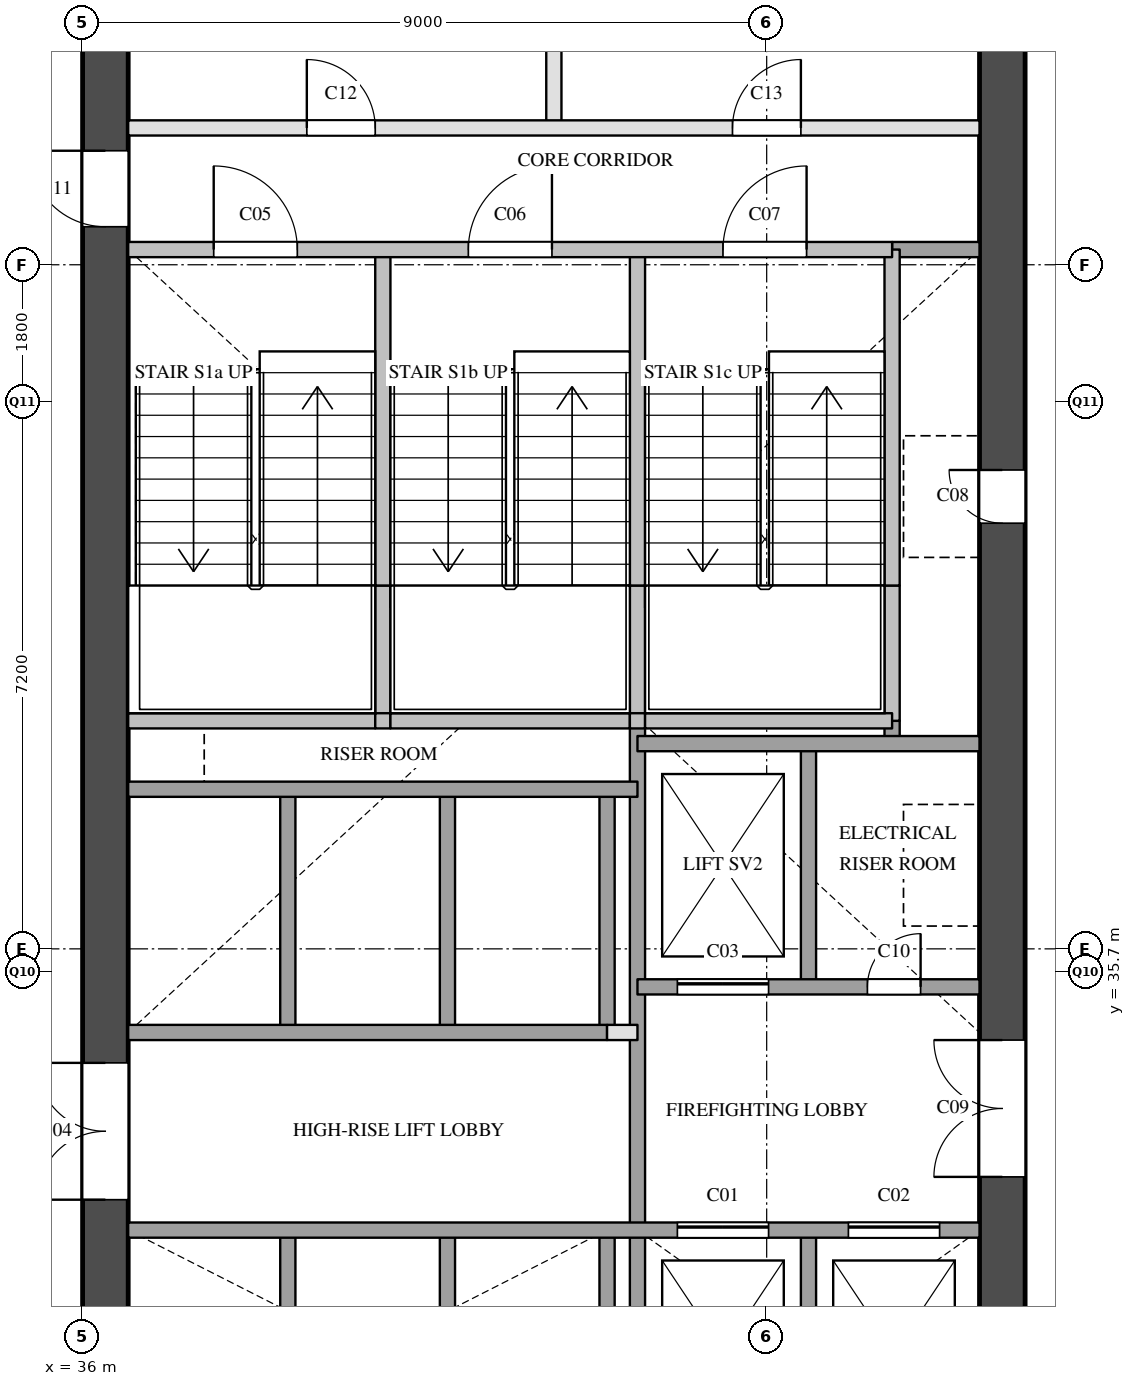
"""IFC4 building model, lengths in metres.
Left out: names, types, materials, properties, quantities, classifications, styles, units other than length and angle.
Written with IfcOpenShell. Run it as: python <this file> out.ifc"""

import sys

from ifc_helpers import new_model, si_unit, direction, frame, frame_2d, origin, place, context, subcontext, project, spatial, rectangle, extrude, element, fill, save


model = new_model("IFC4")
c1 = context("Model", 3, precision=1e-05, world=origin(), true_north=direction((0.0, 1.0)))
c2 = subcontext(c1, "Body", "Model", "MODEL_VIEW")
j1 = project(units=[si_unit("LENGTHUNIT", "METRE"), si_unit("PLANEANGLEUNIT", "RADIAN")], contexts=[c1])
p1 = place(None, origin())
s1 = spatial("IfcSite", under=j1, at=p1, CompositionType="ELEMENT")
p2 = place(p1, origin())
s2 = spatial("IfcBuilding", under=s1, at=p2, CompositionType="ELEMENT")
p3 = place(p2, frame((0.0, 0.0, 119.6)))
s3 = spatial("IfcBuildingStorey", under=s2, at=p3, CompositionType="ELEMENT", Elevation=119.6)
p4 = place(p3, frame((36.3, 29.1, 0.0), z_axis=(0.0, 0.0, 1.0), x_axis=(0.0, 1.0, 0.0)))
e1 = element("IfcWall", 1, at=p4, inside=s3, PredefinedType="SHEAR", context=c2, shape_type="SweptSolid", body=[
    extrude(rectangle(XDim=20.3, YDim=0.6, at=frame_2d((10.15, 0.0))), origin(), (0.0, 0.0, 1.0), 3.3),
])
p5 = place(p4, frame((3.6, 0.0, 0.0)))
e2 = element("IfcOpeningElement", 2, at=p5, cuts=e1, PredefinedType="OPENING", context=c2, shape_type="SweptSolid", body=[
    extrude(rectangle(XDim=1.8, YDim=2.1, at=frame_2d((0.9, 1.05))), frame((0.0, 0.31, 0.0), z_axis=(0.0, -1.0, 0.0), x_axis=(1.0, 0.0, 0.0)), (0.0, 0.0, 1.0), 0.62),
])
p6 = place(p4, frame((16.4, 0.0, 0.0)))
e3 = element("IfcOpeningElement", 3, at=p6, cuts=e1, PredefinedType="OPENING", context=c2, shape_type="SweptSolid", body=[
    extrude(rectangle(XDim=1.0, YDim=2.1, at=frame_2d((0.5, 1.05))), frame((0.0, 0.31, 0.0), z_axis=(0.0, -1.0, 0.0), x_axis=(1.0, 0.0, 0.0)), (0.0, 0.0, 1.0), 0.62),
])
p7 = place(p3, frame((48.1, 29.1, 0.0), z_axis=(0.0, 0.0, 1.0), x_axis=(0.0, 1.0, 0.0)))
e4 = element("IfcWall", 4, at=p7, inside=s3, PredefinedType="SHEAR", context=c2, shape_type="SweptSolid", body=[
    extrude(rectangle(XDim=20.3, YDim=0.6, at=frame_2d((10.15, 0.0))), origin(), (0.0, 0.0, 1.0), 3.3),
])
p8 = place(p7, frame((12.5, 0.0, 0.0)))
e5 = element("IfcOpeningElement", 5, at=p8, cuts=e4, PredefinedType="OPENING", context=c2, shape_type="SweptSolid", body=[
    extrude(rectangle(XDim=0.7, YDim=2.1, at=frame_2d((0.35, 1.05))), frame((0.0, 0.31, 0.0), z_axis=(0.0, -1.0, 0.0), x_axis=(1.0, 0.0, 0.0)), (0.0, 0.0, 1.0), 0.62),
])
p9 = place(p7, frame((3.9, 0.0, 0.0)))
e6 = element("IfcOpeningElement", 6, at=p9, cuts=e4, PredefinedType="OPENING", context=c2, shape_type="SweptSolid", body=[
    extrude(rectangle(XDim=1.8, YDim=2.1, at=frame_2d((0.9, 1.05))), frame((0.0, 0.31, 0.0), z_axis=(0.0, -1.0, 0.0), x_axis=(1.0, 0.0, 0.0)), (0.0, 0.0, 1.0), 0.62),
])
p10 = place(p3, frame((38.7, 29.1, 0.0), z_axis=(0.0, 0.0, 1.0), x_axis=(0.0, 1.0, 0.0)))
e7 = element("IfcWall", 7, at=p10, inside=s3, PredefinedType="SOLIDWALL", context=c2, shape_type="SweptSolid", body=[
    extrude(rectangle(XDim=3.2, YDim=0.2, at=frame_2d((1.6, 0.0))), origin(), (0.0, 0.0, 1.0), 3.3),
])
p11 = place(p3, frame((38.7, 34.9, 0.0), z_axis=(0.0, 0.0, 1.0), x_axis=(0.0, 1.0, 0.0)))
e8 = element("IfcWall", 8, at=p11, inside=s3, PredefinedType="SOLIDWALL", context=c2, shape_type="SweptSolid", body=[
    extrude(rectangle(XDim=3.2, YDim=0.2, at=frame_2d((1.6, 0.0))), origin(), (0.0, 0.0, 1.0), 3.3),
])
p12 = place(p3, frame((39.95, 39.0, 0.0), z_axis=(0.0, 0.0, 1.0), x_axis=(0.0, 1.0, 0.0)))
e9 = element("IfcWall", 9, at=p12, inside=s3, PredefinedType="SOLIDWALL", context=c2, shape_type="SweptSolid", body=[
    extrude(rectangle(XDim=1.78, YDim=0.2, at=frame_2d((0.89, 0.0))), origin(), (0.0, 0.0, 1.0), 3.3),
])
p13 = place(p3, frame((39.95, 40.78, 0.0), z_axis=(0.0, 0.0, 1.0), x_axis=(0.0, 1.0, 0.0)))
e10 = element("IfcWall", 10, at=p13, inside=s3, PredefinedType="SOLIDWALL", context=c2, shape_type="SweptSolid", body=[
    extrude(rectangle(XDim=4.42, YDim=0.2, at=frame_2d((2.21, 0.0))), origin(), (0.0, 0.0, 1.0), 3.3),
])
p14 = place(p3, frame((40.8, 29.1, 0.0), z_axis=(0.0, 0.0, 1.0), x_axis=(0.0, 1.0, 0.0)))
e11 = element("IfcWall", 11, at=p14, inside=s3, PredefinedType="SOLIDWALL", context=c2, shape_type="SweptSolid", body=[
    extrude(rectangle(XDim=3.2, YDim=0.2, at=frame_2d((1.6, 0.0))), origin(), (0.0, 0.0, 1.0), 3.3),
])
p15 = place(p3, frame((40.8, 34.9, 0.0), z_axis=(0.0, 0.0, 1.0), x_axis=(0.0, 1.0, 0.0)))
e12 = element("IfcWall", 12, at=p15, inside=s3, PredefinedType="SOLIDWALL", context=c2, shape_type="SweptSolid", body=[
    extrude(rectangle(XDim=3.2, YDim=0.2, at=frame_2d((1.6, 0.0))), origin(), (0.0, 0.0, 1.0), 3.3),
])
p16 = place(p3, frame((42.2, 46.8, 0.0), z_axis=(0.0, 0.0, 1.0), x_axis=(0.0, 1.0, 0.0)))
e13 = element("IfcWall", 13, at=p16, inside=s3, PredefinedType="PARTITIONING", context=c2, shape_type="SweptSolid", body=[
    extrude(rectangle(XDim=2.2, YDim=0.2, at=frame_2d((1.1, 0.0))), origin(), (0.0, 0.0, 1.0), 3.3),
])
p17 = place(p3, frame((42.9, 29.1, 0.0), z_axis=(0.0, 0.0, 1.0), x_axis=(0.0, 1.0, 0.0)))
e14 = element("IfcWall", 14, at=p17, inside=s3, PredefinedType="SOLIDWALL", context=c2, shape_type="SweptSolid", body=[
    extrude(rectangle(XDim=3.2, YDim=0.2, at=frame_2d((1.6, 0.0))), origin(), (0.0, 0.0, 1.0), 3.3),
])
p18 = place(p3, frame((42.9, 34.9, 0.0), z_axis=(0.0, 0.0, 1.0), x_axis=(0.0, 1.0, 0.0)))
e15 = element("IfcWall", 15, at=p18, inside=s3, PredefinedType="SOLIDWALL", context=c2, shape_type="SweptSolid", body=[
    extrude(rectangle(XDim=3.2, YDim=0.2, at=frame_2d((1.6, 0.0))), origin(), (0.0, 0.0, 1.0), 3.3),
])
p19 = place(p3, frame((43.3, 29.1, 0.0), z_axis=(0.0, 0.0, 1.0), x_axis=(0.0, 1.0, 0.0)))
e16 = element("IfcWall", 16, at=p19, inside=s3, PredefinedType="SOLIDWALL", context=c2, shape_type="SweptSolid", body=[
    extrude(rectangle(XDim=9.9, YDim=0.2, at=frame_2d((4.95, 0.0))), origin(), (0.0, 0.0, 1.0), 3.3),
])
p20 = place(p3, frame((43.3, 39.0, 0.0), z_axis=(0.0, 0.0, 1.0), x_axis=(0.0, 1.0, 0.0)))
e17 = element("IfcWall", 17, at=p20, inside=s3, PredefinedType="SOLIDWALL", context=c2, shape_type="SweptSolid", body=[
    extrude(rectangle(XDim=1.78, YDim=0.2, at=frame_2d((0.89, 0.0))), origin(), (0.0, 0.0, 1.0), 3.3),
])
p21 = place(p3, frame((43.3, 40.78, 0.0), z_axis=(0.0, 0.0, 1.0), x_axis=(0.0, 1.0, 0.0)))
e18 = element("IfcWall", 18, at=p21, inside=s3, PredefinedType="SOLIDWALL", context=c2, shape_type="SweptSolid", body=[
    extrude(rectangle(XDim=4.42, YDim=0.2, at=frame_2d((2.21, 0.0))), origin(), (0.0, 0.0, 1.0), 3.3),
])
for number, where, z_axis, x_axis in (
    (19, (45.55, 29.1, 0.0), (0.0, 0.0, 1.0), (0.0, 1.0, 0.0)),
    (20, (45.55, 35.5, 0.0), (0.0, 0.0, 1.0), (0.0, 1.0, 0.0)),
):
    element("IfcWall", number, at=place(p3, frame(where, z_axis=z_axis, x_axis=x_axis)), inside=s3, PredefinedType="SOLIDWALL", context=c2, shape_type="SweptSolid", body=[
        extrude(rectangle(XDim=3.2, YDim=0.2, at=frame_2d((1.6, 0.0))), origin(), (0.0, 0.0, 1.0), 3.3),
    ])
p22 = place(p3, frame((46.65, 38.7, 0.0), z_axis=(0.0, 0.0, 1.0), x_axis=(0.0, 1.0, 0.0)))
e21 = element("IfcWall", 21, at=p22, inside=s3, PredefinedType="SOLIDWALL", context=c2, shape_type="SweptSolid", body=[
    extrude(rectangle(XDim=0.3, YDim=0.2, at=frame_2d((0.15, 0.0))), origin(), (0.0, 0.0, 1.0), 3.3),
])
p23 = place(p3, frame((46.65, 39.0, 0.0), z_axis=(0.0, 0.0, 1.0), x_axis=(0.0, 1.0, 0.0)))
e22 = element("IfcWall", 22, at=p23, inside=s3, PredefinedType="SOLIDWALL", context=c2, shape_type="SweptSolid", body=[
    extrude(rectangle(XDim=1.78, YDim=0.2, at=frame_2d((0.89, 0.0))), origin(), (0.0, 0.0, 1.0), 3.3),
])
p24 = place(p3, frame((46.65, 40.78, 0.0), z_axis=(0.0, 0.0, 1.0), x_axis=(0.0, 1.0, 0.0)))
e23 = element("IfcWall", 23, at=p24, inside=s3, PredefinedType="SOLIDWALL", context=c2, shape_type="SweptSolid", body=[
    extrude(rectangle(XDim=4.42, YDim=0.2, at=frame_2d((2.21, 0.0))), origin(), (0.0, 0.0, 1.0), 3.3),
])
p25 = place(p3, frame((36.6, 32.3, 0.0), z_axis=(0.0, 0.0, 1.0), x_axis=(1.0, 0.0, 0.0)))
e24 = element("IfcWall", 24, at=p25, inside=s3, PredefinedType="SOLIDWALL", context=c2, shape_type="SweptSolid", body=[
    extrude(rectangle(XDim=11.2, YDim=0.2, at=frame_2d((5.6, 0.0))), origin(), (0.0, 0.0, 1.0), 3.3),
])
p26 = place(p25, frame((7.225, 0.0, 0.0)))
e25 = element("IfcOpeningElement", 25, at=p26, cuts=e24, PredefinedType="OPENING", context=c2, shape_type="SweptSolid", body=[
    extrude(rectangle(XDim=1.2, YDim=2.1, at=frame_2d((0.6, 1.05))), frame((0.0, 0.11, 0.0), z_axis=(0.0, -1.0, 0.0), x_axis=(1.0, 0.0, 0.0)), (0.0, 0.0, 1.0), 0.22),
])
p27 = place(p25, frame((9.475, 0.0, 0.0)))
e26 = element("IfcOpeningElement", 26, at=p27, cuts=e24, PredefinedType="OPENING", context=c2, shape_type="SweptSolid", body=[
    extrude(rectangle(XDim=1.2, YDim=2.1, at=frame_2d((0.6, 1.05))), frame((0.0, 0.11, 0.0), z_axis=(0.0, -1.0, 0.0), x_axis=(1.0, 0.0, 0.0)), (0.0, 0.0, 1.0), 0.22),
])
p28 = place(p3, frame((42.9, 34.9, 0.0), z_axis=(0.0, 0.0, 1.0), x_axis=(1.0, 0.0, 0.0)))
e27 = element("IfcWall", 27, at=p28, inside=s3, PredefinedType="PARTITIONING", context=c2, shape_type="SweptSolid", body=[
    extrude(rectangle(XDim=0.4, YDim=0.2, at=frame_2d((0.2, 0.0))), origin(), (0.0, 0.0, 1.0), 3.3),
])
p29 = place(p3, frame((36.6, 34.9, 0.0), z_axis=(0.0, 0.0, 1.0), x_axis=(1.0, 0.0, 0.0)))
e28 = element("IfcWall", 28, at=p29, inside=s3, PredefinedType="SOLIDWALL", context=c2, shape_type="SweptSolid", body=[
    extrude(rectangle(XDim=6.3, YDim=0.2, at=frame_2d((3.15, 0.0))), origin(), (0.0, 0.0, 1.0), 3.3),
])
p30 = place(p3, frame((43.3, 35.5, 0.0), z_axis=(0.0, 0.0, 1.0), x_axis=(1.0, 0.0, 0.0)))
e29 = element("IfcWall", 29, at=p30, inside=s3, PredefinedType="SOLIDWALL", context=c2, shape_type="SweptSolid", body=[
    extrude(rectangle(XDim=4.5, YDim=0.2, at=frame_2d((2.25, 0.0))), origin(), (0.0, 0.0, 1.0), 3.3),
])
p31 = place(p30, frame((0.525, 0.0, 0.0)))
e30 = element("IfcOpeningElement", 30, at=p31, cuts=e29, PredefinedType="OPENING", context=c2, shape_type="SweptSolid", body=[
    extrude(rectangle(XDim=1.2, YDim=2.1, at=frame_2d((0.6, 1.05))), frame((0.0, 0.11, 0.0), z_axis=(0.0, -1.0, 0.0), x_axis=(1.0, 0.0, 0.0)), (0.0, 0.0, 1.0), 0.22),
])
p32 = place(p30, frame((3.025, 0.0, 0.0)))
e31 = element("IfcOpeningElement", 31, at=p32, cuts=e29, PredefinedType="OPENING", context=c2, shape_type="SweptSolid", body=[
    extrude(rectangle(XDim=0.7, YDim=2.1, at=frame_2d((0.35, 1.05))), frame((0.0, 0.11, 0.0), z_axis=(0.0, -1.0, 0.0), x_axis=(1.0, 0.0, 0.0)), (0.0, 0.0, 1.0), 0.22),
])
p33 = place(p3, frame((36.6, 38.1, 0.0), z_axis=(0.0, 0.0, 1.0), x_axis=(1.0, 0.0, 0.0)))
e32 = element("IfcWall", 32, at=p33, inside=s3, PredefinedType="SOLIDWALL", context=c2, shape_type="SweptSolid", body=[
    extrude(rectangle(XDim=6.7, YDim=0.2, at=frame_2d((3.35, 0.0))), origin(), (0.0, 0.0, 1.0), 3.3),
])
p34 = place(p3, frame((43.3, 38.7, 0.0), z_axis=(0.0, 0.0, 1.0), x_axis=(1.0, 0.0, 0.0)))
e33 = element("IfcWall", 33, at=p34, inside=s3, PredefinedType="SOLIDWALL", context=c2, shape_type="SweptSolid", body=[
    extrude(rectangle(XDim=4.5, YDim=0.2, at=frame_2d((2.25, 0.0))), origin(), (0.0, 0.0, 1.0), 3.3),
])
p35 = place(p3, frame((36.6, 39.0, 0.0), z_axis=(0.0, 0.0, 1.0), x_axis=(1.0, 0.0, 0.0)))
e34 = element("IfcWall", 34, at=p35, inside=s3, PredefinedType="SOLIDWALL", context=c2, shape_type="SweptSolid", body=[
    extrude(rectangle(XDim=3.25, YDim=0.2, at=frame_2d((1.625, 0.0))), origin(), (0.0, 0.0, 1.0), 3.3),
])
p36 = place(p3, frame((39.85, 39.0, 0.0), z_axis=(0.0, 0.0, 1.0), x_axis=(1.0, 0.0, 0.0)))
e35 = element("IfcWall", 35, at=p36, inside=s3, PredefinedType="SOLIDWALL", context=c2, shape_type="SweptSolid", body=[
    extrude(rectangle(XDim=0.2, YDim=0.2, at=frame_2d((0.1, 0.0))), origin(), (0.0, 0.0, 1.0), 3.3),
])
p37 = place(p3, frame((40.05, 39.0, 0.0), z_axis=(0.0, 0.0, 1.0), x_axis=(1.0, 0.0, 0.0)))
e36 = element("IfcWall", 36, at=p37, inside=s3, PredefinedType="SOLIDWALL", context=c2, shape_type="SweptSolid", body=[
    extrude(rectangle(XDim=3.15, YDim=0.2, at=frame_2d((1.575, 0.0))), origin(), (0.0, 0.0, 1.0), 3.3),
])
p38 = place(p3, frame((43.2, 39.0, 0.0), z_axis=(0.0, 0.0, 1.0), x_axis=(1.0, 0.0, 0.0)))
e37 = element("IfcWall", 37, at=p38, inside=s3, PredefinedType="SOLIDWALL", context=c2, shape_type="SweptSolid", body=[
    extrude(rectangle(XDim=0.2, YDim=0.2, at=frame_2d((0.1, 0.0))), origin(), (0.0, 0.0, 1.0), 3.3),
])
p39 = place(p3, frame((43.4, 39.0, 0.0), z_axis=(0.0, 0.0, 1.0), x_axis=(1.0, 0.0, 0.0)))
e38 = element("IfcWall", 38, at=p39, inside=s3, PredefinedType="SOLIDWALL", context=c2, shape_type="SweptSolid", body=[
    extrude(rectangle(XDim=3.25, YDim=0.2, at=frame_2d((1.625, 0.0))), origin(), (0.0, 0.0, 1.0), 3.3),
])
p40 = place(p3, frame((46.65, 45.2, 0.0), z_axis=(0.0, 0.0, 1.0), x_axis=(1.0, 0.0, 0.0)))
e39 = element("IfcWall", 39, at=p40, inside=s3, PredefinedType="SOLIDWALL", context=c2, shape_type="SweptSolid", body=[
    extrude(rectangle(XDim=1.15, YDim=0.2, at=frame_2d((0.575, 0.0))), origin(), (0.0, 0.0, 1.0), 3.3),
])
p41 = place(p3, frame((36.6, 45.2, 0.0), z_axis=(0.0, 0.0, 1.0), x_axis=(1.0, 0.0, 0.0)))
e40 = element("IfcWall", 40, at=p41, inside=s3, PredefinedType="SOLIDWALL", context=c2, shape_type="SweptSolid", body=[
    extrude(rectangle(XDim=10.05, YDim=0.2, at=frame_2d((5.025, 0.0))), origin(), (0.0, 0.0, 1.0), 3.3),
])
p42 = place(p41, frame((1.125, 0.0, 0.0)))
e41 = element("IfcOpeningElement", 41, at=p42, cuts=e40, PredefinedType="OPENING", context=c2, shape_type="SweptSolid", body=[
    extrude(rectangle(XDim=1.1, YDim=2.1, at=frame_2d((0.55, 1.05))), frame((0.0, 0.11, 0.0), z_axis=(0.0, -1.0, 0.0), x_axis=(1.0, 0.0, 0.0)), (0.0, 0.0, 1.0), 0.22),
])
p43 = place(p41, frame((4.475, 0.0, 0.0)))
e42 = element("IfcOpeningElement", 42, at=p43, cuts=e40, PredefinedType="OPENING", context=c2, shape_type="SweptSolid", body=[
    extrude(rectangle(XDim=1.1, YDim=2.1, at=frame_2d((0.55, 1.05))), frame((0.0, 0.11, 0.0), z_axis=(0.0, -1.0, 0.0), x_axis=(1.0, 0.0, 0.0)), (0.0, 0.0, 1.0), 0.22),
])
p44 = place(p41, frame((7.825, 0.0, 0.0)))
e43 = element("IfcOpeningElement", 43, at=p44, cuts=e40, PredefinedType="OPENING", context=c2, shape_type="SweptSolid", body=[
    extrude(rectangle(XDim=1.1, YDim=2.1, at=frame_2d((0.55, 1.05))), frame((0.0, 0.11, 0.0), z_axis=(0.0, -1.0, 0.0), x_axis=(1.0, 0.0, 0.0)), (0.0, 0.0, 1.0), 0.22),
])
p45 = place(p3, frame((36.6, 46.8, 0.0), z_axis=(0.0, 0.0, 1.0), x_axis=(1.0, 0.0, 0.0)))
e44 = element("IfcWall", 44, at=p45, inside=s3, PredefinedType="PARTITIONING", context=c2, shape_type="SweptSolid", body=[
    extrude(rectangle(XDim=11.2, YDim=0.2, at=frame_2d((5.6, 0.0))), origin(), (0.0, 0.0, 1.0), 3.3),
])
p46 = place(p45, frame((2.35, 0.0, 0.0)))
e45 = element("IfcOpeningElement", 45, at=p46, cuts=e44, PredefinedType="OPENING", context=c2, shape_type="SweptSolid", body=[
    extrude(rectangle(XDim=0.9, YDim=2.1, at=frame_2d((0.45, 1.05))), frame((0.0, 0.11, 0.0), z_axis=(0.0, -1.0, 0.0), x_axis=(1.0, 0.0, 0.0)), (0.0, 0.0, 1.0), 0.22),
])
p47 = place(p45, frame((7.95, 0.0, 0.0)))
e46 = element("IfcOpeningElement", 46, at=p47, cuts=e44, PredefinedType="OPENING", context=c2, shape_type="SweptSolid", body=[
    extrude(rectangle(XDim=0.9, YDim=2.1, at=frame_2d((0.45, 1.05))), frame((0.0, 0.11, 0.0), z_axis=(0.0, -1.0, 0.0), x_axis=(1.0, 0.0, 0.0)), (0.0, 0.0, 1.0), 0.22),
])
p48 = place(p26, origin())
e47 = element("IfcDoor", 47, at=p48, inside=s3, OperationType="SLIDING_TO_LEFT", PredefinedType="DOOR", context=c2, shape_type="SweptSolid", body=[
    extrude(rectangle(XDim=1.2, YDim=2.1, at=frame_2d((0.6, 1.05))), frame((0.0, 0.025, 0.0), z_axis=(0.0, -1.0, 0.0), x_axis=(1.0, 0.0, 0.0)), (0.0, 0.0, 1.0), 0.05),
])
fill(e25, e47)
p49 = place(p27, origin())
e48 = element("IfcDoor", 48, at=p49, inside=s3, OperationType="SLIDING_TO_LEFT", PredefinedType="DOOR", context=c2, shape_type="SweptSolid", body=[
    extrude(rectangle(XDim=1.2, YDim=2.1, at=frame_2d((0.6, 1.05))), frame((0.0, 0.025, 0.0), z_axis=(0.0, -1.0, 0.0), x_axis=(1.0, 0.0, 0.0)), (0.0, 0.0, 1.0), 0.05),
])
fill(e26, e48)
p50 = place(p31, origin())
e49 = element("IfcDoor", 49, at=p50, inside=s3, OperationType="SLIDING_TO_LEFT", PredefinedType="DOOR", context=c2, shape_type="SweptSolid", body=[
    extrude(rectangle(XDim=1.2, YDim=2.1, at=frame_2d((0.6, 1.05))), frame((0.0, 0.025, 0.0), z_axis=(0.0, -1.0, 0.0), x_axis=(1.0, 0.0, 0.0)), (0.0, 0.0, 1.0), 0.05),
])
fill(e30, e49)
p51 = place(p5, origin())
e50 = element("IfcDoor", 50, at=p51, inside=s3, OperationType="DOUBLE_DOOR_SINGLE_SWING", PredefinedType="DOOR", context=c2, shape_type="SweptSolid", body=[
    extrude(rectangle(XDim=1.8, YDim=2.1, at=frame_2d((0.9, 1.05))), frame((0.0, 0.025, 0.0), z_axis=(0.0, -1.0, 0.0), x_axis=(1.0, 0.0, 0.0)), (0.0, 0.0, 1.0), 0.05),
])
fill(e2, e50)
p52 = place(p42, origin())
e51 = element("IfcDoor", 51, at=p52, inside=s3, OperationType="SINGLE_SWING_LEFT", PredefinedType="DOOR", context=c2, shape_type="SweptSolid", body=[
    extrude(rectangle(XDim=1.1, YDim=2.1, at=frame_2d((0.55, 1.05))), frame((0.0, 0.025, 0.0), z_axis=(0.0, -1.0, 0.0), x_axis=(1.0, 0.0, 0.0)), (0.0, 0.0, 1.0), 0.05),
])
fill(e41, e51)
p53 = place(p43, origin())
e52 = element("IfcDoor", 52, at=p53, inside=s3, OperationType="SINGLE_SWING_RIGHT", PredefinedType="DOOR", context=c2, shape_type="SweptSolid", body=[
    extrude(rectangle(XDim=1.1, YDim=2.1, at=frame_2d((0.55, 1.05))), frame((0.0, 0.025, 0.0), z_axis=(0.0, -1.0, 0.0), x_axis=(1.0, 0.0, 0.0)), (0.0, 0.0, 1.0), 0.05),
])
fill(e42, e52)
p54 = place(p44, origin())
e53 = element("IfcDoor", 53, at=p54, inside=s3, OperationType="SINGLE_SWING_RIGHT", PredefinedType="DOOR", context=c2, shape_type="SweptSolid", body=[
    extrude(rectangle(XDim=1.1, YDim=2.1, at=frame_2d((0.55, 1.05))), frame((0.0, 0.025, 0.0), z_axis=(0.0, -1.0, 0.0), x_axis=(1.0, 0.0, 0.0)), (0.0, 0.0, 1.0), 0.05),
])
fill(e43, e53)
p55 = place(p8, origin())
e54 = element("IfcDoor", 54, at=p55, inside=s3, OperationType="SINGLE_SWING_RIGHT", PredefinedType="DOOR", context=c2, shape_type="SweptSolid", body=[
    extrude(rectangle(XDim=0.7, YDim=2.1, at=frame_2d((0.35, 1.05))), frame((0.0, 0.025, 0.0), z_axis=(0.0, -1.0, 0.0), x_axis=(1.0, 0.0, 0.0)), (0.0, 0.0, 1.0), 0.05),
])
fill(e5, e54)
p56 = place(p9, origin())
e55 = element("IfcDoor", 55, at=p56, inside=s3, OperationType="DOUBLE_DOOR_SINGLE_SWING", PredefinedType="DOOR", context=c2, shape_type="SweptSolid", body=[
    extrude(rectangle(XDim=1.8, YDim=2.1, at=frame_2d((0.9, 1.05))), frame((0.0, 0.025, 0.0), z_axis=(0.0, -1.0, 0.0), x_axis=(1.0, 0.0, 0.0)), (0.0, 0.0, 1.0), 0.05),
])
fill(e6, e55)
p57 = place(p32, origin())
e56 = element("IfcDoor", 56, at=p57, inside=s3, OperationType="SINGLE_SWING_RIGHT", PredefinedType="DOOR", context=c2, shape_type="SweptSolid", body=[
    extrude(rectangle(XDim=0.7, YDim=2.1, at=frame_2d((0.35, 1.05))), frame((0.0, 0.025, 0.0), z_axis=(0.0, -1.0, 0.0), x_axis=(1.0, 0.0, 0.0)), (0.0, 0.0, 1.0), 0.05),
])
fill(e31, e56)
p58 = place(p6, origin())
e57 = element("IfcDoor", 57, at=p58, inside=s3, OperationType="SINGLE_SWING_RIGHT", PredefinedType="DOOR", context=c2, shape_type="SweptSolid", body=[
    extrude(rectangle(XDim=1.0, YDim=2.1, at=frame_2d((0.5, 1.05))), frame((0.0, 0.025, 0.0), z_axis=(0.0, -1.0, 0.0), x_axis=(1.0, 0.0, 0.0)), (0.0, 0.0, 1.0), 0.05),
])
fill(e3, e57)
p59 = place(p46, origin())
e58 = element("IfcDoor", 58, at=p59, inside=s3, OperationType="SINGLE_SWING_LEFT", PredefinedType="DOOR", context=c2, shape_type="SweptSolid", body=[
    extrude(rectangle(XDim=0.9, YDim=2.1, at=frame_2d((0.45, 1.05))), frame((0.0, 0.025, 0.0), z_axis=(0.0, -1.0, 0.0), x_axis=(1.0, 0.0, 0.0)), (0.0, 0.0, 1.0), 0.05),
])
fill(e45, e58)
p60 = place(p47, origin())
e59 = element("IfcDoor", 59, at=p60, inside=s3, OperationType="SINGLE_SWING_RIGHT", PredefinedType="DOOR", context=c2, shape_type="SweptSolid", body=[
    extrude(rectangle(XDim=0.9, YDim=2.1, at=frame_2d((0.45, 1.05))), frame((0.0, 0.025, 0.0), z_axis=(0.0, -1.0, 0.0), x_axis=(1.0, 0.0, 0.0)), (0.0, 0.0, 1.0), 0.05),
])
fill(e46, e59)
save(model, sys.argv[1])
